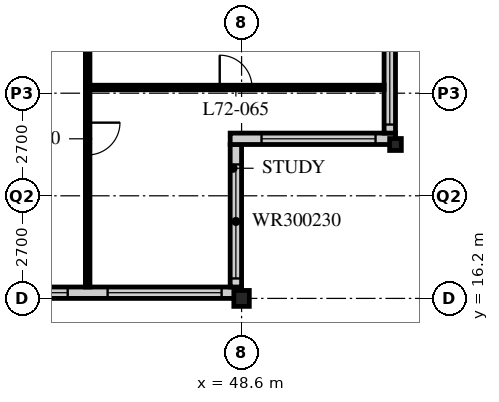
"""IFC4 building model, lengths in metres.
Left out: names, types, materials, properties, quantities, classifications, styles, units other than length and angle.
Written with IfcOpenShell. Run it as: python <this file> out.ifc"""

import sys

from ifc_helpers import new_model, si_unit, direction, frame, frame_2d, origin, origin_2d, place, context, subcontext, project, spatial, rectangle, i_section, extrude, element, fill, save


model = new_model("IFC4")
c1 = context("Model", 3, precision=1e-05, world=origin(), true_north=direction((0.0, 1.0)))
c2 = subcontext(c1, "Body", "Model", "MODEL_VIEW")
j1 = project(units=[si_unit("LENGTHUNIT", "METRE"), si_unit("PLANEANGLEUNIT", "RADIAN")], contexts=[c1])
p1 = place(None, origin())
s1 = spatial("IfcSite", under=j1, at=p1, CompositionType="ELEMENT")
p2 = place(p1, origin())
s2 = spatial("IfcBuilding", under=s1, at=p2, CompositionType="ELEMENT")
p3 = place(p2, frame((0.0, 0.0, 281.4)))
s3 = spatial("IfcBuildingStorey", under=s2, at=p3, CompositionType="ELEMENT", Elevation=281.4)
p4 = place(p3, frame((48.6, 16.2, 0.0), z_axis=(0.0, 0.0, 1.0), x_axis=(1.0, 0.0, 0.0)))
e1 = element("IfcColumn", 1, at=p4, inside=s3, PredefinedType="COLUMN", context=c2, shape_type="SweptSolid", body=[
    extrude(i_section(OverallWidth=0.407, OverallDepth=0.419, WebThickness=0.031, FlangeThickness=0.049, FilletRadius=0.015, at=origin_2d()), origin(), (0.0, 0.0, 1.0), 3.9),
])
p5 = place(p3, frame((52.65, 20.25, 0.0), z_axis=(0.0, 0.0, 1.0), x_axis=(1.0, 0.0, 0.0)))
e2 = element("IfcColumn", 2, at=p5, inside=s3, PredefinedType="COLUMN", context=c2, shape_type="SweptSolid", body=[
    extrude(i_section(OverallWidth=0.307, OverallDepth=0.314, WebThickness=0.012, FlangeThickness=0.019, FilletRadius=0.015, at=origin_2d()), origin(), (0.0, 0.0, 1.0), 3.9),
])
p6 = place(p3, frame((8.4, 16.35, 0.0), z_axis=(0.0, 0.0, 1.0), x_axis=(1.0, 0.0, 0.0)))
e3 = element("IfcWall", 3, at=p6, inside=s3, PredefinedType="SOLIDWALL", context=c2, shape_type="SweptSolid", body=[
    extrude(rectangle(XDim=40.2, YDim=0.3, at=frame_2d((20.1, 0.0))), origin(), (0.0, 0.0, 1.0), 3.69),
])
p7 = place(p6, frame((0.225, 0.0, 0.6)))
e4 = element("IfcOpeningElement", 4, at=p7, cuts=e3, PredefinedType="OPENING", context=c2, shape_type="SweptSolid", body=[
    extrude(rectangle(XDim=3.0, YDim=2.4, at=frame_2d((1.5, 1.2))), frame((0.0, 0.16, 0.0), z_axis=(0.0, -1.0, 0.0), x_axis=(1.0, 0.0, 0.0)), (0.0, 0.0, 1.0), 0.32),
])
p8 = place(p6, frame((4.275, 0.0, 0.6)))
e5 = element("IfcOpeningElement", 5, at=p8, cuts=e3, PredefinedType="OPENING", context=c2, shape_type="SweptSolid", body=[
    extrude(rectangle(XDim=3.0, YDim=2.4, at=frame_2d((1.5, 1.2))), frame((0.0, 0.16, 0.0), z_axis=(0.0, -1.0, 0.0), x_axis=(1.0, 0.0, 0.0)), (0.0, 0.0, 1.0), 0.32),
])
p9 = place(p6, frame((8.325, 0.0, 0.6)))
e6 = element("IfcOpeningElement", 6, at=p9, cuts=e3, PredefinedType="OPENING", context=c2, shape_type="SweptSolid", body=[
    extrude(rectangle(XDim=3.0, YDim=2.4, at=frame_2d((1.5, 1.2))), frame((0.0, 0.16, 0.0), z_axis=(0.0, -1.0, 0.0), x_axis=(1.0, 0.0, 0.0)), (0.0, 0.0, 1.0), 0.32),
])
p10 = place(p6, frame((12.375, 0.0, 0.6)))
e7 = element("IfcOpeningElement", 7, at=p10, cuts=e3, PredefinedType="OPENING", context=c2, shape_type="SweptSolid", body=[
    extrude(rectangle(XDim=3.0, YDim=2.4, at=frame_2d((1.5, 1.2))), frame((0.0, 0.16, 0.0), z_axis=(0.0, -1.0, 0.0), x_axis=(1.0, 0.0, 0.0)), (0.0, 0.0, 1.0), 0.32),
])
p11 = place(p6, frame((16.425, 0.0, 0.6)))
e8 = element("IfcOpeningElement", 8, at=p11, cuts=e3, PredefinedType="OPENING", context=c2, shape_type="SweptSolid", body=[
    extrude(rectangle(XDim=3.0, YDim=2.4, at=frame_2d((1.5, 1.2))), frame((0.0, 0.16, 0.0), z_axis=(0.0, -1.0, 0.0), x_axis=(1.0, 0.0, 0.0)), (0.0, 0.0, 1.0), 0.32),
])
p12 = place(p6, frame((20.475, 0.0, 0.6)))
e9 = element("IfcOpeningElement", 9, at=p12, cuts=e3, PredefinedType="OPENING", context=c2, shape_type="SweptSolid", body=[
    extrude(rectangle(XDim=3.0, YDim=2.4, at=frame_2d((1.5, 1.2))), frame((0.0, 0.16, 0.0), z_axis=(0.0, -1.0, 0.0), x_axis=(1.0, 0.0, 0.0)), (0.0, 0.0, 1.0), 0.32),
])
p13 = place(p6, frame((24.525, 0.0, 0.6)))
e10 = element("IfcOpeningElement", 10, at=p13, cuts=e3, PredefinedType="OPENING", context=c2, shape_type="SweptSolid", body=[
    extrude(rectangle(XDim=3.0, YDim=2.4, at=frame_2d((1.5, 1.2))), frame((0.0, 0.16, 0.0), z_axis=(0.0, -1.0, 0.0), x_axis=(1.0, 0.0, 0.0)), (0.0, 0.0, 1.0), 0.32),
])
p14 = place(p6, frame((28.575, 0.0, 0.6)))
e11 = element("IfcOpeningElement", 11, at=p14, cuts=e3, PredefinedType="OPENING", context=c2, shape_type="SweptSolid", body=[
    extrude(rectangle(XDim=3.0, YDim=2.4, at=frame_2d((1.5, 1.2))), frame((0.0, 0.16, 0.0), z_axis=(0.0, -1.0, 0.0), x_axis=(1.0, 0.0, 0.0)), (0.0, 0.0, 1.0), 0.32),
])
p15 = place(p6, frame((32.625, 0.0, 0.6)))
e12 = element("IfcOpeningElement", 12, at=p15, cuts=e3, PredefinedType="OPENING", context=c2, shape_type="SweptSolid", body=[
    extrude(rectangle(XDim=3.0, YDim=2.4, at=frame_2d((1.5, 1.2))), frame((0.0, 0.16, 0.0), z_axis=(0.0, -1.0, 0.0), x_axis=(1.0, 0.0, 0.0)), (0.0, 0.0, 1.0), 0.32),
])
p16 = place(p6, frame((36.675, 0.0, 0.6)))
e13 = element("IfcOpeningElement", 13, at=p16, cuts=e3, PredefinedType="OPENING", context=c2, shape_type="SweptSolid", body=[
    extrude(rectangle(XDim=3.0, YDim=2.4, at=frame_2d((1.5, 1.2))), frame((0.0, 0.16, 0.0), z_axis=(0.0, -1.0, 0.0), x_axis=(1.0, 0.0, 0.0)), (0.0, 0.0, 1.0), 0.32),
])
p17 = place(p3, frame((48.45, 16.5, 0.0), z_axis=(0.0, 0.0, 1.0), x_axis=(0.0, 1.0, 0.0)))
e14 = element("IfcWall", 14, at=p17, inside=s3, PredefinedType="SOLIDWALL", context=c2, shape_type="SweptSolid", body=[
    extrude(rectangle(XDim=3.75, YDim=0.3, at=frame_2d((1.875, 0.0))), origin(), (0.0, 0.0, 1.0), 3.69),
])
p18 = place(p17, frame((0.225, 0.0, 0.6)))
e15 = element("IfcOpeningElement", 15, at=p18, cuts=e14, PredefinedType="OPENING", context=c2, shape_type="SweptSolid", body=[
    extrude(rectangle(XDim=3.0, YDim=2.3, at=frame_2d((1.5, 1.15))), frame((0.0, 0.16, 0.0), z_axis=(0.0, -1.0, 0.0), x_axis=(1.0, 0.0, 0.0)), (0.0, 0.0, 1.0), 0.32),
])
p19 = place(p3, frame((48.3, 20.4, 0.0), z_axis=(0.0, 0.0, 1.0), x_axis=(1.0, 0.0, 0.0)))
e16 = element("IfcWall", 16, at=p19, inside=s3, PredefinedType="SOLIDWALL", context=c2, shape_type="SweptSolid", body=[
    extrude(rectangle(XDim=4.35, YDim=0.3, at=frame_2d((2.175, 0.0))), origin(), (0.0, 0.0, 1.0), 3.69),
])
p20 = place(p19, frame((0.825, 0.0, 0.6)))
e17 = element("IfcOpeningElement", 17, at=p20, cuts=e16, PredefinedType="OPENING", context=c2, shape_type="SweptSolid", body=[
    extrude(rectangle(XDim=3.0, YDim=2.3, at=frame_2d((1.5, 1.15))), frame((0.0, 0.16, 0.0), z_axis=(0.0, -1.0, 0.0), x_axis=(1.0, 0.0, 0.0)), (0.0, 0.0, 1.0), 0.32),
])
p21 = place(p3, frame((52.5, 20.55, 0.0), z_axis=(0.0, 0.0, 1.0), x_axis=(0.0, 1.0, 0.0)))
e18 = element("IfcWall", 18, at=p21, inside=s3, PredefinedType="SOLIDWALL", context=c2, shape_type="SweptSolid", body=[
    extrude(rectangle(XDim=3.75, YDim=0.3, at=frame_2d((1.875, 0.0))), origin(), (0.0, 0.0, 1.0), 3.69),
])
p22 = place(p21, frame((0.225, 0.0, 0.6)))
e19 = element("IfcOpeningElement", 19, at=p22, cuts=e18, PredefinedType="OPENING", context=c2, shape_type="SweptSolid", body=[
    extrude(rectangle(XDim=3.0, YDim=2.3, at=frame_2d((1.5, 1.15))), frame((0.0, 0.16, 0.0), z_axis=(0.0, -1.0, 0.0), x_axis=(1.0, 0.0, 0.0)), (0.0, 0.0, 1.0), 0.32),
])
p23 = place(p3, frame((44.55, 16.5, 0.0), z_axis=(0.0, 0.0, 1.0), x_axis=(0.0, 1.0, 0.0)))
e20 = element("IfcWall", 20, at=p23, inside=s3, PredefinedType="PARTITIONING", context=c2, shape_type="SweptSolid", body=[
    extrude(rectangle(XDim=7.8, YDim=0.12, at=frame_2d((3.9, 0.0))), origin(), (0.0, 0.0, 1.0), 3.69),
])
p24 = place(p23, frame((3.475, 0.0, 0.0)))
e21 = element("IfcOpeningElement", 21, at=p24, cuts=e20, PredefinedType="OPENING", context=c2, shape_type="SweptSolid", body=[
    extrude(rectangle(XDim=0.85, YDim=2.1, at=frame_2d((0.425, 1.05))), frame((0.0, 0.07, 0.0), z_axis=(0.0, -1.0, 0.0), x_axis=(1.0, 0.0, 0.0)), (0.0, 0.0, 1.0), 0.14),
])
p25 = place(p3, frame((44.55, 21.75, 0.0), z_axis=(0.0, 0.0, 1.0), x_axis=(1.0, 0.0, 0.0)))
e22 = element("IfcWall", 22, at=p25, inside=s3, PredefinedType="PARTITIONING", context=c2, shape_type="SweptSolid", body=[
    extrude(rectangle(XDim=7.8, YDim=0.12, at=frame_2d((3.9, 0.0))), origin(), (0.0, 0.0, 1.0), 3.69),
])
p26 = place(p25, frame((3.475, 0.0, 0.0)))
e23 = element("IfcOpeningElement", 23, at=p26, cuts=e22, PredefinedType="OPENING", context=c2, shape_type="SweptSolid", body=[
    extrude(rectangle(XDim=0.85, YDim=2.1, at=frame_2d((0.425, 1.05))), frame((0.0, 0.07, 0.0), z_axis=(0.0, -1.0, 0.0), x_axis=(1.0, 0.0, 0.0)), (0.0, 0.0, 1.0), 0.14),
])
p27 = place(p15, origin())
e24 = element("IfcWindow", 24, at=p27, inside=s3, PartitioningType="SINGLE_PANEL", PredefinedType="WINDOW", context=c2, shape_type="SweptSolid", body=[
    extrude(rectangle(XDim=3.0, YDim=2.4, at=frame_2d((1.5, 1.2))), frame((0.0, 0.03, 0.0), z_axis=(0.0, -1.0, 0.0), x_axis=(1.0, 0.0, 0.0)), (0.0, 0.0, 1.0), 0.06),
])
fill(e12, e24)
p28 = place(p16, origin())
e25 = element("IfcWindow", 25, at=p28, inside=s3, PartitioningType="SINGLE_PANEL", PredefinedType="WINDOW", context=c2, shape_type="SweptSolid", body=[
    extrude(rectangle(XDim=3.0, YDim=2.4, at=frame_2d((1.5, 1.2))), frame((0.0, 0.03, 0.0), z_axis=(0.0, -1.0, 0.0), x_axis=(1.0, 0.0, 0.0)), (0.0, 0.0, 1.0), 0.06),
])
fill(e13, e25)
p29 = place(p18, origin())
e26 = element("IfcWindow", 26, at=p29, inside=s3, PartitioningType="SINGLE_PANEL", PredefinedType="WINDOW", context=c2, shape_type="SweptSolid", body=[
    extrude(rectangle(XDim=3.0, YDim=2.3, at=frame_2d((1.5, 1.15))), frame((0.0, 0.03, 0.0), z_axis=(0.0, -1.0, 0.0), x_axis=(1.0, 0.0, 0.0)), (0.0, 0.0, 1.0), 0.06),
])
fill(e15, e26)
p30 = place(p20, origin())
e27 = element("IfcWindow", 27, at=p30, inside=s3, PartitioningType="SINGLE_PANEL", PredefinedType="WINDOW", context=c2, shape_type="SweptSolid", body=[
    extrude(rectangle(XDim=3.0, YDim=2.3, at=frame_2d((1.5, 1.15))), frame((0.0, 0.03, 0.0), z_axis=(0.0, -1.0, 0.0), x_axis=(1.0, 0.0, 0.0)), (0.0, 0.0, 1.0), 0.06),
])
fill(e17, e27)
p31 = place(p22, origin())
e28 = element("IfcWindow", 28, at=p31, inside=s3, PartitioningType="SINGLE_PANEL", PredefinedType="WINDOW", context=c2, shape_type="SweptSolid", body=[
    extrude(rectangle(XDim=3.0, YDim=2.3, at=frame_2d((1.5, 1.15))), frame((0.0, 0.03, 0.0), z_axis=(0.0, -1.0, 0.0), x_axis=(1.0, 0.0, 0.0)), (0.0, 0.0, 1.0), 0.06),
])
fill(e19, e28)
p32 = place(p24, origin())
e29 = element("IfcDoor", 29, at=p32, inside=s3, OperationType="SINGLE_SWING_LEFT", PredefinedType="DOOR", context=c2, shape_type="SweptSolid", body=[
    extrude(rectangle(XDim=0.85, YDim=2.1, at=frame_2d((0.425, 1.05))), frame((0.0, 0.025, 0.0), z_axis=(0.0, -1.0, 0.0), x_axis=(1.0, 0.0, 0.0)), (0.0, 0.0, 1.0), 0.05),
])
fill(e21, e29)
p33 = place(p26, origin())
e30 = element("IfcDoor", 30, at=p33, inside=s3, OperationType="SINGLE_SWING_LEFT", PredefinedType="DOOR", context=c2, shape_type="SweptSolid", body=[
    extrude(rectangle(XDim=0.85, YDim=2.1, at=frame_2d((0.425, 1.05))), frame((0.0, 0.025, 0.0), z_axis=(0.0, -1.0, 0.0), x_axis=(1.0, 0.0, 0.0)), (0.0, 0.0, 1.0), 0.05),
])
fill(e23, e30)
save(model, sys.argv[1])
